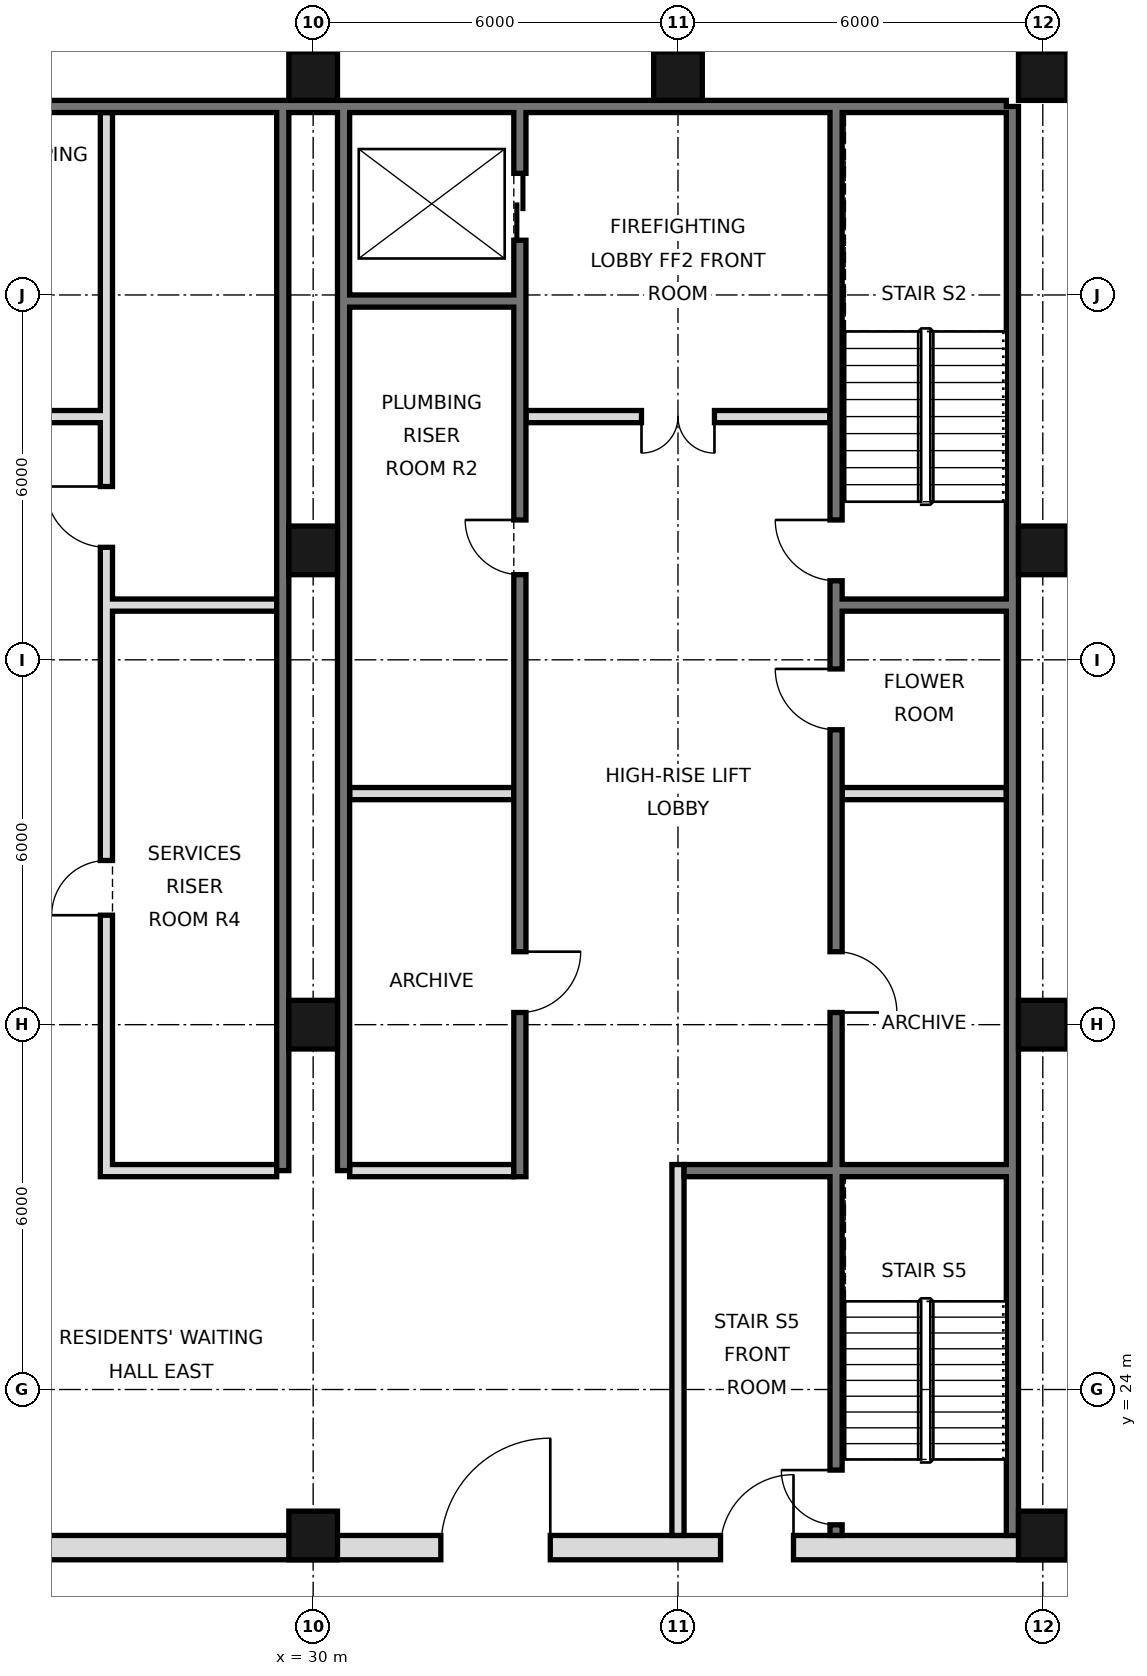
"""IFC4 building model, lengths in metres.
Left out: names, types, materials, properties, quantities, classifications, styles, units other than length and angle.
Written with IfcOpenShell. Run it as: python <this file> out.ifc"""

import sys

from ifc_helpers import new_model, si_unit, direction, frame, frame_2d, origin, origin_2d, place, context, subcontext, project, spatial, rectangle, hollow_rectangle, extrude, element, fill, save


model = new_model("IFC4")
c1 = context("Model", 3, precision=1e-05, world=origin(), true_north=direction((0.0, 1.0)))
c2 = subcontext(c1, "Body", "Model", "MODEL_VIEW")
j1 = project(units=[si_unit("LENGTHUNIT", "METRE"), si_unit("PLANEANGLEUNIT", "RADIAN")], contexts=[c1])
p1 = place(None, origin())
s1 = spatial("IfcSite", under=j1, at=p1, CompositionType="ELEMENT")
p2 = place(p1, origin())
s2 = spatial("IfcBuilding", under=s1, at=p2, CompositionType="ELEMENT")
p3 = place(p2, frame((0.0, 0.0, 143.8)))
s3 = spatial("IfcBuildingStorey", under=s2, at=p3, CompositionType="ELEMENT", Elevation=143.8)
for number, where, z_axis, x_axis in (
    (1, (30.0, 21.6, 0.0), (0.0, 0.0, 1.0), (1.0, 0.0, 0.0)),
    (2, (30.0, 30.0, 0.0), (0.0, 0.0, 1.0), (1.0, 0.0, 0.0)),
    (3, (30.0, 37.8, 0.0), (0.0, 0.0, 1.0), (1.0, 0.0, 0.0)),
    (4, (30.0, 45.6, 0.0), (0.0, 0.0, 1.0), (1.0, 0.0, 0.0)),
    (5, (36.0, 45.6, 0.0), (0.0, 0.0, 1.0), (1.0, 0.0, 0.0)),
    (6, (42.0, 21.6, 0.0), (0.0, 0.0, 1.0), (1.0, 0.0, 0.0)),
    (7, (42.0, 30.0, 0.0), (0.0, 0.0, 1.0), (1.0, 0.0, 0.0)),
    (8, (42.0, 37.8, 0.0), (0.0, 0.0, 1.0), (1.0, 0.0, 0.0)),
    (9, (42.0, 45.6, 0.0), (0.0, 0.0, 1.0), (1.0, 0.0, 0.0)),
):
    element("IfcColumn", number, at=place(p3, frame(where, z_axis=z_axis, x_axis=x_axis)), inside=s3, PredefinedType="COLUMN", context=c2, shape_type="SweptSolid", body=[
        extrude(hollow_rectangle(XDim=0.8, YDim=0.8, WallThickness=0.05, at=origin_2d()), origin(), (0.0, 0.0, 1.0), 3.6),
    ])
p4 = place(p3, frame((41.5, 21.6, 0.0), z_axis=(0.0, 0.0, 1.0), x_axis=(0.0, 1.0, 0.0)))
e10 = element("IfcWall", 10, at=p4, inside=s3, PredefinedType="SOLIDWALL", context=c2, shape_type="SweptSolid", body=[
    extrude(rectangle(XDim=23.5, YDim=0.2, at=frame_2d((11.75, 0.0))), origin(), (0.0, 0.0, 1.0), 3.42),
])
p5 = place(p3, frame((6.6, 45.1, 0.0), z_axis=(0.0, 0.0, 1.0), x_axis=(1.0, 0.0, 0.0)))
e11 = element("IfcWall", 11, at=p5, inside=s3, PredefinedType="SOLIDWALL", context=c2, shape_type="SweptSolid", body=[
    extrude(rectangle(XDim=34.8, YDim=0.2, at=frame_2d((17.4, 0.0))), origin(), (0.0, 0.0, 1.0), 3.42),
])
for number, where, z_axis, x_axis in (
    (12, (29.5, 27.6, 0.0), (0.0, 0.0, 1.0), (0.0, 1.0, 0.0)),
    (13, (30.5, 27.6, 0.0), (0.0, 0.0, 1.0), (0.0, 1.0, 0.0)),
):
    element("IfcWall", number, at=place(p3, frame(where, z_axis=z_axis, x_axis=x_axis)), inside=s3, PredefinedType="SOLIDWALL", context=c2, shape_type="SweptSolid", body=[
        extrude(rectangle(XDim=17.5, YDim=0.2, at=frame_2d((8.75, 0.0))), origin(), (0.0, 0.0, 1.0), 3.42),
    ])
p6 = place(p3, frame((5.6, 21.4, 0.0), z_axis=(0.0, 0.0, 1.0), x_axis=(1.0, 0.0, 0.0)))
e14 = element("IfcWall", 14, at=p6, inside=s3, PredefinedType="SOLIDWALL", context=c2, shape_type="SweptSolid", body=[
    extrude(rectangle(XDim=36.8, YDim=0.4, at=frame_2d((18.4, 0.0))), origin(), (0.0, 0.0, 1.0), 3.42),
])
p7 = place(p6, frame((8.5, 0.0, 0.0)))
e15 = element("IfcOpeningElement", 15, at=p7, cuts=e14, PredefinedType="OPENING", context=c2, shape_type="SweptSolid", body=[
    extrude(rectangle(XDim=1.8, YDim=2.1, at=frame_2d((0.9, 1.05))), frame((0.0, 0.21, 0.0), z_axis=(0.0, -1.0, 0.0), x_axis=(1.0, 0.0, 0.0)), (0.0, 0.0, 1.0), 0.42),
])
p8 = place(p6, frame((17.5, 0.0, 0.0)))
e16 = element("IfcOpeningElement", 16, at=p8, cuts=e14, PredefinedType="OPENING", context=c2, shape_type="SweptSolid", body=[
    extrude(rectangle(XDim=1.8, YDim=2.1, at=frame_2d((0.9, 1.05))), frame((0.0, 0.21, 0.0), z_axis=(0.0, -1.0, 0.0), x_axis=(1.0, 0.0, 0.0)), (0.0, 0.0, 1.0), 0.42),
])
p9 = place(p6, frame((26.5, 0.0, 0.0)))
e17 = element("IfcOpeningElement", 17, at=p9, cuts=e14, PredefinedType="OPENING", context=c2, shape_type="SweptSolid", body=[
    extrude(rectangle(XDim=1.8, YDim=2.1, at=frame_2d((0.9, 1.05))), frame((0.0, 0.21, 0.0), z_axis=(0.0, -1.0, 0.0), x_axis=(1.0, 0.0, 0.0)), (0.0, 0.0, 1.0), 0.42),
])
p10 = place(p6, frame((4.5, 0.0, 0.0)))
e18 = element("IfcOpeningElement", 18, at=p10, cuts=e14, PredefinedType="OPENING", context=c2, shape_type="SweptSolid", body=[
    extrude(rectangle(XDim=1.2, YDim=2.1, at=frame_2d((0.6, 1.05))), frame((0.0, 0.21, 0.0), z_axis=(0.0, -1.0, 0.0), x_axis=(1.0, 0.0, 0.0)), (0.0, 0.0, 1.0), 0.42),
])
p11 = place(p6, frame((31.1, 0.0, 0.0)))
e19 = element("IfcOpeningElement", 19, at=p11, cuts=e14, PredefinedType="OPENING", context=c2, shape_type="SweptSolid", body=[
    extrude(rectangle(XDim=1.2, YDim=2.1, at=frame_2d((0.6, 1.05))), frame((0.0, 0.21, 0.0), z_axis=(0.0, -1.0, 0.0), x_axis=(1.0, 0.0, 0.0)), (0.0, 0.0, 1.0), 0.42),
])
p12 = place(p3, frame((26.6, 27.5, 0.0), z_axis=(0.0, 0.0, 1.0), x_axis=(0.0, 1.0, 0.0)))
e20 = element("IfcWall", 20, at=p12, inside=s3, PredefinedType="SOLIDWALL", context=c2, shape_type="SweptSolid", body=[
    extrude(rectangle(XDim=17.5, YDim=0.2, at=frame_2d((8.75, 0.0))), origin(), (0.0, 0.0, 1.0), 3.42),
])
p13 = place(p12, frame((4.3, 0.0, 0.0)))
e21 = element("IfcOpeningElement", 21, at=p13, cuts=e20, PredefinedType="OPENING", context=c2, shape_type="SweptSolid", body=[
    extrude(rectangle(XDim=0.9, YDim=2.1, at=frame_2d((0.45, 1.05))), frame((0.0, 0.11, 0.0), z_axis=(0.0, -1.0, 0.0), x_axis=(1.0, 0.0, 0.0)), (0.0, 0.0, 1.0), 0.22),
])
p14 = place(p12, frame((10.35, 0.0, 0.0)))
e22 = element("IfcOpeningElement", 22, at=p14, cuts=e20, PredefinedType="OPENING", context=c2, shape_type="SweptSolid", body=[
    extrude(rectangle(XDim=1.0, YDim=2.1, at=frame_2d((0.5, 1.05))), frame((0.0, 0.11, 0.0), z_axis=(0.0, -1.0, 0.0), x_axis=(1.0, 0.0, 0.0)), (0.0, 0.0, 1.0), 0.22),
])
p15 = place(p3, frame((33.4, 27.5, 0.0), z_axis=(0.0, 0.0, 1.0), x_axis=(0.0, 1.0, 0.0)))
e23 = element("IfcWall", 23, at=p15, inside=s3, PredefinedType="SOLIDWALL", context=c2, shape_type="SweptSolid", body=[
    extrude(rectangle(XDim=17.5, YDim=0.2, at=frame_2d((8.75, 0.0))), origin(), (0.0, 0.0, 1.0), 3.42),
])
p16 = place(p15, frame((15.4, 0.0, 0.0)))
e24 = element("IfcOpeningElement", 24, at=p16, cuts=e23, PredefinedType="OPENING", context=c2, shape_type="SweptSolid", body=[
    extrude(rectangle(XDim=1.1, YDim=2.1, at=frame_2d((0.55, 1.05))), frame((0.0, 0.11, 0.0), z_axis=(0.0, -1.0, 0.0), x_axis=(1.0, 0.0, 0.0)), (0.0, 0.0, 1.0), 0.22),
])
p17 = place(p15, frame((2.7, 0.0, 0.0)))
e25 = element("IfcOpeningElement", 25, at=p17, cuts=e23, PredefinedType="OPENING", context=c2, shape_type="SweptSolid", body=[
    extrude(rectangle(XDim=1.0, YDim=2.1, at=frame_2d((0.5, 1.05))), frame((0.0, 0.11, 0.0), z_axis=(0.0, -1.0, 0.0), x_axis=(1.0, 0.0, 0.0)), (0.0, 0.0, 1.0), 0.22),
])
p18 = place(p15, frame((9.9, 0.0, 0.0)))
e26 = element("IfcOpeningElement", 26, at=p18, cuts=e23, PredefinedType="OPENING", context=c2, shape_type="SweptSolid", body=[
    extrude(rectangle(XDim=0.9, YDim=2.1, at=frame_2d((0.45, 1.05))), frame((0.0, 0.11, 0.0), z_axis=(0.0, -1.0, 0.0), x_axis=(1.0, 0.0, 0.0)), (0.0, 0.0, 1.0), 0.22),
])
p19 = place(p3, frame((36.0, 21.6, 0.0), z_axis=(0.0, 0.0, 1.0), x_axis=(0.0, 1.0, 0.0)))
e27 = element("IfcWall", 27, at=p19, inside=s3, PredefinedType="PARTITIONING", context=c2, shape_type="SweptSolid", body=[
    extrude(rectangle(XDim=6.1, YDim=0.2, at=frame_2d((3.05, 0.0))), origin(), (0.0, 0.0, 1.0), 3.42),
])
p20 = place(p3, frame((38.6, 21.6, 0.0), z_axis=(0.0, 0.0, 1.0), x_axis=(0.0, 1.0, 0.0)))
e28 = element("IfcWall", 28, at=p20, inside=s3, PredefinedType="SOLIDWALL", context=c2, shape_type="SweptSolid", body=[
    extrude(rectangle(XDim=23.4, YDim=0.2, at=frame_2d((11.7, 0.0))), origin(), (0.0, 0.0, 1.0), 3.42),
])
p21 = place(p20, frame((8.6, 0.0, 0.0)))
e29 = element("IfcOpeningElement", 29, at=p21, cuts=e28, PredefinedType="OPENING", context=c2, shape_type="SweptSolid", body=[
    extrude(rectangle(XDim=1.0, YDim=2.1, at=frame_2d((0.5, 1.05))), frame((0.0, 0.11, 0.0), z_axis=(0.0, -1.0, 0.0), x_axis=(1.0, 0.0, 0.0)), (0.0, 0.0, 1.0), 0.22),
])
p22 = place(p20, frame((13.25, 0.0, 0.0)))
e30 = element("IfcOpeningElement", 30, at=p22, cuts=e28, PredefinedType="OPENING", context=c2, shape_type="SweptSolid", body=[
    extrude(rectangle(XDim=1.0, YDim=2.1, at=frame_2d((0.5, 1.05))), frame((0.0, 0.11, 0.0), z_axis=(0.0, -1.0, 0.0), x_axis=(1.0, 0.0, 0.0)), (0.0, 0.0, 1.0), 0.22),
])
p23 = place(p20, frame((15.7, 0.0, 0.0)))
e31 = element("IfcOpeningElement", 31, at=p23, cuts=e28, PredefinedType="OPENING", context=c2, shape_type="SweptSolid", body=[
    extrude(rectangle(XDim=1.0, YDim=2.1, at=frame_2d((0.5, 1.05))), frame((0.0, 0.11, 0.0), z_axis=(0.0, -1.0, 0.0), x_axis=(1.0, 0.0, 0.0)), (0.0, 0.0, 1.0), 0.22),
])
p24 = place(p20, frame((0.175, 0.0, 0.0)))
e32 = element("IfcOpeningElement", 32, at=p24, cuts=e28, PredefinedType="OPENING", context=c2, shape_type="SweptSolid", body=[
    extrude(rectangle(XDim=0.9, YDim=2.1, at=frame_2d((0.45, 1.05))), frame((0.0, 0.11, 0.0), z_axis=(0.0, -1.0, 0.0), x_axis=(1.0, 0.0, 0.0)), (0.0, 0.0, 1.0), 0.22),
])
p25 = place(p3, frame((26.7, 27.6, 0.0), z_axis=(0.0, 0.0, 1.0), x_axis=(1.0, 0.0, 0.0)))
e33 = element("IfcWall", 33, at=p25, inside=s3, PredefinedType="SOLIDWALL", context=c2, shape_type="SweptSolid", body=[
    extrude(rectangle(XDim=2.7, YDim=0.2, at=frame_2d((1.35, 0.0))), origin(), (0.0, 0.0, 1.0), 3.42),
])
p26 = place(p3, frame((30.6, 27.6, 0.0), z_axis=(0.0, 0.0, 1.0), x_axis=(1.0, 0.0, 0.0)))
e34 = element("IfcWall", 34, at=p26, inside=s3, PredefinedType="PARTITIONING", context=c2, shape_type="SweptSolid", body=[
    extrude(rectangle(XDim=2.7, YDim=0.2, at=frame_2d((1.35, 0.0))), origin(), (0.0, 0.0, 1.0), 3.42),
])
p27 = place(p3, frame((36.1, 27.6, 0.0), z_axis=(0.0, 0.0, 1.0), x_axis=(1.0, 0.0, 0.0)))
e35 = element("IfcWall", 35, at=p27, inside=s3, PredefinedType="SOLIDWALL", context=c2, shape_type="SweptSolid", body=[
    extrude(rectangle(XDim=5.3, YDim=0.2, at=frame_2d((2.65, 0.0))), origin(), (0.0, 0.0, 1.0), 3.42),
])
p28 = place(p3, frame((30.6, 33.8, 0.0), z_axis=(0.0, 0.0, 1.0), x_axis=(1.0, 0.0, 0.0)))
e36 = element("IfcWall", 36, at=p28, inside=s3, PredefinedType="SOLIDWALL", context=c2, shape_type="SweptSolid", body=[
    extrude(rectangle(XDim=2.7, YDim=0.2, at=frame_2d((1.35, 0.0))), origin(), (0.0, 0.0, 1.0), 3.42),
])
p29 = place(p3, frame((38.7, 33.8, 0.0), z_axis=(0.0, 0.0, 1.0), x_axis=(1.0, 0.0, 0.0)))
e37 = element("IfcWall", 37, at=p29, inside=s3, PredefinedType="PARTITIONING", context=c2, shape_type="SweptSolid", body=[
    extrude(rectangle(XDim=2.7, YDim=0.2, at=frame_2d((1.35, 0.0))), origin(), (0.0, 0.0, 1.0), 3.42),
])
for number, where, z_axis, x_axis in (
    (38, (26.7, 36.9, 0.0), (0.0, 0.0, 1.0), (1.0, 0.0, 0.0)),
    (39, (38.7, 36.9, 0.0), (0.0, 0.0, 1.0), (1.0, 0.0, 0.0)),
):
    element("IfcWall", number, at=place(p3, frame(where, z_axis=z_axis, x_axis=x_axis)), inside=s3, PredefinedType="SOLIDWALL", context=c2, shape_type="SweptSolid", body=[
        extrude(rectangle(XDim=2.7, YDim=0.2, at=frame_2d((1.35, 0.0))), origin(), (0.0, 0.0, 1.0), 3.42),
    ])
p30 = place(p3, frame((21.5, 40.0, 0.0), z_axis=(0.0, 0.0, 1.0), x_axis=(1.0, 0.0, 0.0)))
e40 = element("IfcWall", 40, at=p30, inside=s3, PredefinedType="PARTITIONING", context=c2, shape_type="SweptSolid", body=[
    extrude(rectangle(XDim=5.0, YDim=0.2, at=frame_2d((2.5, 0.0))), origin(), (0.0, 0.0, 1.0), 3.42),
])
p31 = place(p30, frame((1.9, 0.0, 0.0)))
e41 = element("IfcOpeningElement", 41, at=p31, cuts=e40, PredefinedType="OPENING", context=c2, shape_type="SweptSolid", body=[
    extrude(rectangle(XDim=1.2, YDim=2.1, at=frame_2d((0.6, 1.05))), frame((0.0, 0.11, 0.0), z_axis=(0.0, -1.0, 0.0), x_axis=(1.0, 0.0, 0.0)), (0.0, 0.0, 1.0), 0.22),
])
p32 = place(p3, frame((33.5, 40.0, 0.0), z_axis=(0.0, 0.0, 1.0), x_axis=(1.0, 0.0, 0.0)))
e42 = element("IfcWall", 42, at=p32, inside=s3, PredefinedType="PARTITIONING", context=c2, shape_type="SweptSolid", body=[
    extrude(rectangle(XDim=5.0, YDim=0.2, at=frame_2d((2.5, 0.0))), origin(), (0.0, 0.0, 1.0), 3.42),
])
p33 = place(p32, frame((1.9, 0.0, 0.0)))
e43 = element("IfcOpeningElement", 43, at=p33, cuts=e42, PredefinedType="OPENING", context=c2, shape_type="SweptSolid", body=[
    extrude(rectangle(XDim=1.2, YDim=2.1, at=frame_2d((0.6, 1.05))), frame((0.0, 0.11, 0.0), z_axis=(0.0, -1.0, 0.0), x_axis=(1.0, 0.0, 0.0)), (0.0, 0.0, 1.0), 0.22),
])
p34 = place(p3, frame((30.6, 41.9, 0.0), z_axis=(0.0, 0.0, 1.0), x_axis=(1.0, 0.0, 0.0)))
e44 = element("IfcWall", 44, at=p34, inside=s3, PredefinedType="SOLIDWALL", context=c2, shape_type="SweptSolid", body=[
    extrude(rectangle(XDim=2.7, YDim=0.2, at=frame_2d((1.35, 0.0))), origin(), (0.0, 0.0, 1.0), 3.42),
])
p35 = place(p9, frame((1.8, 0.0, 0.0), z_axis=(0.0, 0.0, 1.0), x_axis=(-1.0, 0.0, 0.0)))
e45 = element("IfcDoor", 45, at=p35, inside=s3, OperationType="SINGLE_SWING_LEFT", PredefinedType="DOOR", context=c2, shape_type="SweptSolid", body=[
    extrude(rectangle(XDim=1.8, YDim=2.1, at=frame_2d((0.9, 1.05))), frame((0.0, 0.025, 0.0), z_axis=(0.0, -1.0, 0.0), x_axis=(1.0, 0.0, 0.0)), (0.0, 0.0, 1.0), 0.05),
])
fill(e17, e45)
p36 = place(p11, frame((1.2, 0.0, 0.0), z_axis=(0.0, 0.0, 1.0), x_axis=(-1.0, 0.0, 0.0)))
e46 = element("IfcDoor", 46, at=p36, inside=s3, OperationType="SINGLE_SWING_LEFT", PredefinedType="DOOR", context=c2, shape_type="SweptSolid", body=[
    extrude(rectangle(XDim=1.2, YDim=2.1, at=frame_2d((0.6, 1.05))), frame((0.0, 0.025, 0.0), z_axis=(0.0, -1.0, 0.0), x_axis=(1.0, 0.0, 0.0)), (0.0, 0.0, 1.0), 0.05),
])
fill(e19, e46)
p37 = place(p33, frame((1.2, 0.0, 0.0), z_axis=(0.0, 0.0, 1.0), x_axis=(-1.0, 0.0, 0.0)))
e47 = element("IfcDoor", 47, at=p37, inside=s3, OperationType="DOUBLE_DOOR_SINGLE_SWING", PredefinedType="DOOR", context=c2, shape_type="SweptSolid", body=[
    extrude(rectangle(XDim=1.2, YDim=2.1, at=frame_2d((0.6, 1.05))), frame((0.0, 0.025, 0.0), z_axis=(0.0, -1.0, 0.0), x_axis=(1.0, 0.0, 0.0)), (0.0, 0.0, 1.0), 0.05),
])
fill(e43, e47)
p38 = place(p16, origin())
e48 = element("IfcDoor", 48, at=p38, inside=s3, OperationType="DOUBLE_DOOR_SLIDING", PredefinedType="DOOR", context=c2, shape_type="SweptSolid", body=[
    extrude(rectangle(XDim=1.1, YDim=2.1, at=frame_2d((0.55, 1.05))), frame((0.0, 0.025, 0.0), z_axis=(0.0, -1.0, 0.0), x_axis=(1.0, 0.0, 0.0)), (0.0, 0.0, 1.0), 0.05),
])
fill(e24, e48)
p39 = place(p21, frame((1.0, 0.0, 0.0), z_axis=(0.0, 0.0, 1.0), x_axis=(-1.0, 0.0, 0.0)))
e49 = element("IfcDoor", 49, at=p39, inside=s3, OperationType="SINGLE_SWING_RIGHT", PredefinedType="DOOR", context=c2, shape_type="SweptSolid", body=[
    extrude(rectangle(XDim=1.0, YDim=2.1, at=frame_2d((0.5, 1.05))), frame((0.0, 0.025, 0.0), z_axis=(0.0, -1.0, 0.0), x_axis=(1.0, 0.0, 0.0)), (0.0, 0.0, 1.0), 0.05),
])
fill(e29, e49)
p40 = place(p22, frame((1.0, 0.0, 0.0), z_axis=(0.0, 0.0, 1.0), x_axis=(-1.0, 0.0, 0.0)))
e50 = element("IfcDoor", 50, at=p40, inside=s3, OperationType="SINGLE_SWING_LEFT", PredefinedType="DOOR", context=c2, shape_type="SweptSolid", body=[
    extrude(rectangle(XDim=1.0, YDim=2.1, at=frame_2d((0.5, 1.05))), frame((0.0, 0.025, 0.0), z_axis=(0.0, -1.0, 0.0), x_axis=(1.0, 0.0, 0.0)), (0.0, 0.0, 1.0), 0.05),
])
fill(e30, e50)
p41 = place(p17, origin())
e51 = element("IfcDoor", 51, at=p41, inside=s3, OperationType="SINGLE_SWING_RIGHT", PredefinedType="DOOR", context=c2, shape_type="SweptSolid", body=[
    extrude(rectangle(XDim=1.0, YDim=2.1, at=frame_2d((0.5, 1.05))), frame((0.0, 0.025, 0.0), z_axis=(0.0, -1.0, 0.0), x_axis=(1.0, 0.0, 0.0)), (0.0, 0.0, 1.0), 0.05),
])
fill(e25, e51)
p42 = place(p23, frame((1.0, 0.0, 0.0), z_axis=(0.0, 0.0, 1.0), x_axis=(-1.0, 0.0, 0.0)))
e52 = element("IfcDoor", 52, at=p42, inside=s3, OperationType="SINGLE_SWING_LEFT", PredefinedType="DOOR", context=c2, shape_type="SweptSolid", body=[
    extrude(rectangle(XDim=1.0, YDim=2.1, at=frame_2d((0.5, 1.05))), frame((0.0, 0.025, 0.0), z_axis=(0.0, -1.0, 0.0), x_axis=(1.0, 0.0, 0.0)), (0.0, 0.0, 1.0), 0.05),
])
fill(e31, e52)
p43 = place(p24, frame((0.9, 0.0, 0.0), z_axis=(0.0, 0.0, 1.0), x_axis=(-1.0, 0.0, 0.0)))
e53 = element("IfcDoor", 53, at=p43, inside=s3, OperationType="SINGLE_SWING_LEFT", PredefinedType="DOOR", context=c2, shape_type="SweptSolid", body=[
    extrude(rectangle(XDim=0.9, YDim=2.1, at=frame_2d((0.45, 1.05))), frame((0.0, 0.025, 0.0), z_axis=(0.0, -1.0, 0.0), x_axis=(1.0, 0.0, 0.0)), (0.0, 0.0, 1.0), 0.05),
])
fill(e32, e53)
p44 = place(p18, frame((0.9, 0.0, 0.0), z_axis=(0.0, 0.0, 1.0), x_axis=(-1.0, 0.0, 0.0)))
e54 = element("IfcDoor", 54, at=p44, inside=s3, OperationType="SINGLE_SWING_LEFT", PredefinedType="DOOR", context=c2, shape_type="SweptSolid", body=[
    extrude(rectangle(XDim=0.9, YDim=2.1, at=frame_2d((0.45, 1.05))), frame((0.0, 0.025, 0.0), z_axis=(0.0, -1.0, 0.0), x_axis=(1.0, 0.0, 0.0)), (0.0, 0.0, 1.0), 0.05),
])
fill(e26, e54)
p45 = place(p13, origin())
e55 = element("IfcDoor", 55, at=p45, inside=s3, OperationType="SINGLE_SWING_LEFT", PredefinedType="DOOR", context=c2, shape_type="SweptSolid", body=[
    extrude(rectangle(XDim=0.9, YDim=2.1, at=frame_2d((0.45, 1.05))), frame((0.0, 0.025, 0.0), z_axis=(0.0, -1.0, 0.0), x_axis=(1.0, 0.0, 0.0)), (0.0, 0.0, 1.0), 0.05),
])
fill(e21, e55)
p46 = place(p14, frame((1.0, 0.0, 0.0), z_axis=(0.0, 0.0, 1.0), x_axis=(-1.0, 0.0, 0.0)))
e56 = element("IfcDoor", 56, at=p46, inside=s3, OperationType="SINGLE_SWING_LEFT", PredefinedType="DOOR", context=c2, shape_type="SweptSolid", body=[
    extrude(rectangle(XDim=1.0, YDim=2.1, at=frame_2d((0.5, 1.05))), frame((0.0, 0.025, 0.0), z_axis=(0.0, -1.0, 0.0), x_axis=(1.0, 0.0, 0.0)), (0.0, 0.0, 1.0), 0.05),
])
fill(e22, e56)
save(model, sys.argv[1])
